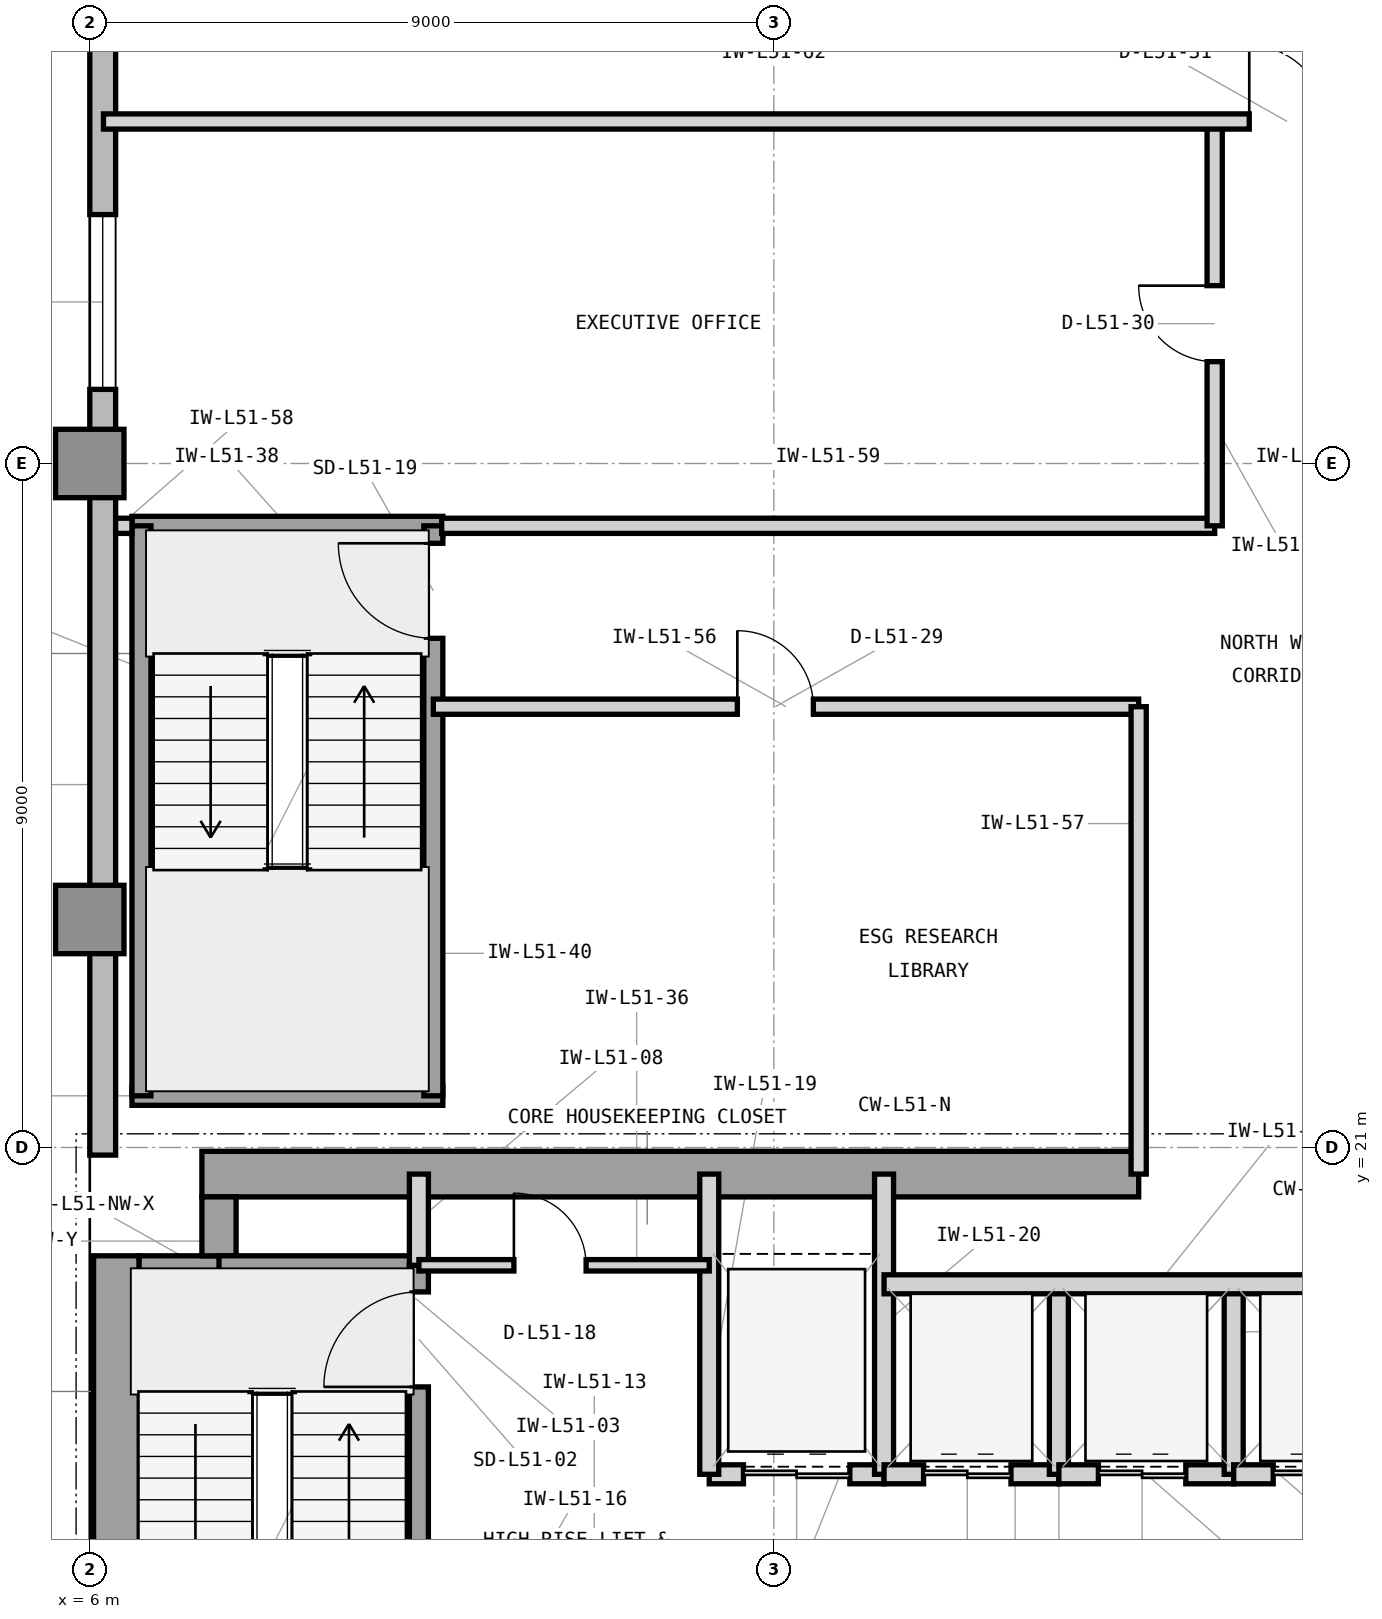
"""IFC4 building model, lengths in metres.
Left out: names, types, materials, properties, quantities, classifications, styles, units other than length and angle.
Written with IfcOpenShell. Run it as: python <this file> out.ifc"""

import sys

from ifc_helpers import new_model, si_unit, direction, frame, frame_2d, origin, origin_2d, place, context, subcontext, project, spatial, rectangle, extrude, element, fill, save


model = new_model("IFC4")
c1 = context("Model", 3, precision=1e-05, world=origin(), true_north=direction((0.0, 1.0)))
c2 = subcontext(c1, "Body", "Model", "MODEL_VIEW")
j1 = project(units=[si_unit("LENGTHUNIT", "METRE"), si_unit("PLANEANGLEUNIT", "RADIAN")], contexts=[c1])
p1 = place(None, origin())
s1 = spatial("IfcSite", under=j1, at=p1, CompositionType="ELEMENT")
p2 = place(p1, origin())
s2 = spatial("IfcBuilding", under=s1, at=p2, CompositionType="ELEMENT")
p3 = place(p2, frame((0.0, 0.0, 211.2)))
s3 = spatial("IfcBuildingStorey", under=s2, at=p3, CompositionType="ELEMENT", Elevation=211.2)
p4 = place(p3, frame((6.35, 4.425, 0.0), z_axis=(0.0, 0.0, 1.0), x_axis=(0.0, 1.0, 0.0)))
e1 = element("IfcWall", 1, at=p4, inside=s3, PredefinedType="SHEAR", context=c2, shape_type="SweptSolid", body=[
    extrude(rectangle(XDim=15.15, YDim=0.6, at=frame_2d((7.575, 0.0))), origin(), (0.0, 0.0, 1.0), 3.9),
])
p5 = place(p3, frame((7.475, 20.65, 0.0), z_axis=(0.0, 0.0, 1.0), x_axis=(1.0, 0.0, 0.0)))
e2 = element("IfcWall", 2, at=p5, inside=s3, PredefinedType="SHEAR", context=c2, shape_type="SweptSolid", body=[
    extrude(rectangle(XDim=12.325, YDim=0.6, at=frame_2d((6.163, 0.0))), origin(), (0.0, 0.0, 1.0), 3.9),
])
p6 = place(p3, frame((6.65, 19.35, 0.0), z_axis=(0.0, 0.0, 1.0), x_axis=(1.0, 0.0, 0.0)))
e3 = element("IfcWall", 3, at=p6, inside=s3, PredefinedType="SHEAR", context=c2, shape_type="SweptSolid", body=[
    extrude(rectangle(XDim=1.275, YDim=0.45, at=frame_2d((0.638, 0.0))), origin(), (0.0, 0.0, 1.0), 3.9),
])
p7 = place(p3, frame((7.7, 19.575, 0.0), z_axis=(0.0, 0.0, 1.0), x_axis=(0.0, 1.0, 0.0)))
e4 = element("IfcWall", 4, at=p7, inside=s3, PredefinedType="SHEAR", context=c2, shape_type="SweptSolid", body=[
    extrude(rectangle(XDim=0.775, YDim=0.45, at=frame_2d((0.388, 0.0))), origin(), (0.0, 0.0, 1.0), 3.9),
])
for number, where, z_axis, x_axis in (
    (5, (6.0, 24.0, 0.0), (0.0, 0.0, 1.0), (1.0, 0.0, 0.0)),
    (6, (6.0, 30.0, 0.0), (0.0, 0.0, 1.0), (1.0, 0.0, 0.0)),
):
    element("IfcColumn", number, at=place(p3, frame(where, z_axis=z_axis, x_axis=x_axis)), inside=s3, PredefinedType="COLUMN", context=c2, shape_type="SweptSolid", body=[
        extrude(rectangle(XDim=0.9, YDim=0.9, at=origin_2d()), origin(), (0.0, 0.0, 1.0), 3.9),
    ])
p8 = place(p3, frame((6.17, 40.4, 0.0), z_axis=(0.0, 0.0, 1.0), x_axis=(0.0, -1.0, 0.0)))
e7 = element("IfcWall", 7, at=p8, inside=s3, PredefinedType="STANDARD", context=c2, shape_type="SweptSolid", body=[
    extrude(rectangle(XDim=19.5, YDim=0.34, at=frame_2d((9.75, 0.0))), origin(), (0.0, 0.0, 1.0), 3.7),
])
p9 = place(p8, frame((7.125, 0.0, 0.9)))
e8 = element("IfcOpeningElement", 8, at=p9, cuts=e7, PredefinedType="OPENING", context=c2, shape_type="SweptSolid", body=[
    extrude(rectangle(XDim=2.3, YDim=2.2, at=frame_2d((1.15, 1.1))), frame((0.0, 0.18, 0.0), z_axis=(0.0, -1.0, 0.0), x_axis=(1.0, 0.0, 0.0)), (0.0, 0.0, 1.0), 0.36),
])
p10 = place(p3, frame((7.7, 19.45, 0.0), z_axis=(0.0, 0.0, 1.0), x_axis=(1.0, 0.0, 0.0)))
e9 = element("IfcWall", 9, at=p10, inside=s3, PredefinedType="SHEAR", context=c2, shape_type="SweptSolid", body=[
    extrude(rectangle(XDim=2.755, YDim=0.25, at=frame_2d((1.377, 0.0))), origin(), (0.0, 0.0, 1.0), 3.9),
])
p11 = place(p3, frame((10.33, 12.0, 0.0), z_axis=(0.0, 0.0, 1.0), x_axis=(0.0, 1.0, 0.0)))
e10 = element("IfcWall", 10, at=p11, inside=s3, PredefinedType="SHEAR", context=c2, shape_type="SweptSolid", body=[
    extrude(rectangle(XDim=7.45, YDim=0.25, at=frame_2d((3.725, 0.0))), origin(), (0.0, 0.0, 1.0), 3.9),
])
p12 = place(p11, frame((5.85, 0.0, 0.0)))
e11 = element("IfcOpeningElement", 11, at=p12, cuts=e10, PredefinedType="OPENING", context=c2, shape_type="SweptSolid", body=[
    extrude(rectangle(XDim=1.25, YDim=2.2, at=frame_2d((0.625, 1.1))), frame((0.0, 0.135, 0.0), z_axis=(0.0, -1.0, 0.0), x_axis=(1.0, 0.0, 0.0)), (0.0, 0.0, 1.0), 0.27),
])
p13 = place(p3, frame((10.33, 19.45, 0.0), z_axis=(0.0, 0.0, 1.0), x_axis=(0.0, 1.0, 0.0)))
e12 = element("IfcWall", 12, at=p13, inside=s3, PredefinedType="PARTITIONING", context=c2, shape_type="SweptSolid", body=[
    extrude(rectangle(XDim=1.2, YDim=0.25, at=frame_2d((0.6, 0.0))), origin(), (0.0, 0.0, 1.0), 3.69),
])
p14 = place(p3, frame((14.15, 16.7, 0.0), z_axis=(0.0, 0.0, 1.0), x_axis=(1.0, 0.0, 0.0)))
e13 = element("IfcWall", 13, at=p14, inside=s3, PredefinedType="PARTITIONING", context=c2, shape_type="SweptSolid", body=[
    extrude(rectangle(XDim=2.3, YDim=0.25, at=frame_2d((1.15, 0.0))), origin(), (0.0, 0.0, 1.0), 3.283),
])
p15 = place(p14, frame((0.45, 0.0, 0.0)))
e14 = element("IfcOpeningElement", 14, at=p15, cuts=e13, PredefinedType="OPENING", context=c2, shape_type="SweptSolid", body=[
    extrude(rectangle(XDim=1.4, YDim=2.35, at=frame_2d((0.7, 1.175))), frame((0.0, 0.135, 0.0), z_axis=(0.0, -1.0, 0.0), x_axis=(1.0, 0.0, 0.0)), (0.0, 0.0, 1.0), 0.27),
])
for number, where, z_axis, x_axis in (
    (15, (14.15, 16.7, 0.0), (0.0, 0.0, 1.0), (0.0, 1.0, 0.0)),
    (16, (16.45, 16.7, 0.0), (0.0, 0.0, 1.0), (0.0, 1.0, 0.0)),
):
    element("IfcWall", number, at=place(p3, frame(where, z_axis=z_axis, x_axis=x_axis)), inside=s3, PredefinedType="PARTITIONING", context=c2, shape_type="SweptSolid", body=[
        extrude(rectangle(XDim=3.95, YDim=0.25, at=frame_2d((1.975, 0.0))), origin(), (0.0, 0.0, 1.0), 3.69),
    ])
p16 = place(p3, frame((16.45, 16.7, 0.0), z_axis=(0.0, 0.0, 1.0), x_axis=(1.0, 0.0, 0.0)))
e17 = element("IfcWall", 17, at=p16, inside=s3, PredefinedType="PARTITIONING", context=c2, shape_type="SweptSolid", body=[
    extrude(rectangle(XDim=2.3, YDim=0.25, at=frame_2d((1.15, 0.0))), origin(), (0.0, 0.0, 1.0), 3.283),
])
p17 = place(p16, frame((0.52, 0.0, 0.0)))
e18 = element("IfcOpeningElement", 18, at=p17, cuts=e17, PredefinedType="OPENING", context=c2, shape_type="SweptSolid", body=[
    extrude(rectangle(XDim=1.15, YDim=2.25, at=frame_2d((0.575, 1.125))), frame((0.0, 0.135, 0.0), z_axis=(0.0, -1.0, 0.0), x_axis=(1.0, 0.0, 0.0)), (0.0, 0.0, 1.0), 0.27),
])
p18 = place(p3, frame((18.75, 16.7, 0.0), z_axis=(0.0, 0.0, 1.0), x_axis=(0.0, 1.0, 0.0)))
e19 = element("IfcWall", 19, at=p18, inside=s3, PredefinedType="PARTITIONING", context=c2, shape_type="SweptSolid", body=[
    extrude(rectangle(XDim=2.5, YDim=0.25, at=frame_2d((1.25, 0.0))), origin(), (0.0, 0.0, 1.0), 3.69),
])
p19 = place(p3, frame((18.75, 16.7, 0.0), z_axis=(0.0, 0.0, 1.0), x_axis=(1.0, 0.0, 0.0)))
e20 = element("IfcWall", 20, at=p19, inside=s3, PredefinedType="PARTITIONING", context=c2, shape_type="SweptSolid", body=[
    extrude(rectangle(XDim=2.3, YDim=0.25, at=frame_2d((1.15, 0.0))), origin(), (0.0, 0.0, 1.0), 3.283),
])
p20 = place(p19, frame((0.52, 0.0, 0.0)))
e21 = element("IfcOpeningElement", 21, at=p20, cuts=e20, PredefinedType="OPENING", context=c2, shape_type="SweptSolid", body=[
    extrude(rectangle(XDim=1.15, YDim=2.25, at=frame_2d((0.575, 1.125))), frame((0.0, 0.135, 0.0), z_axis=(0.0, -1.0, 0.0), x_axis=(1.0, 0.0, 0.0)), (0.0, 0.0, 1.0), 0.27),
])
p21 = place(p3, frame((21.05, 16.7, 0.0), z_axis=(0.0, 0.0, 1.0), x_axis=(0.0, 1.0, 0.0)))
e22 = element("IfcWall", 22, at=p21, inside=s3, PredefinedType="PARTITIONING", context=c2, shape_type="SweptSolid", body=[
    extrude(rectangle(XDim=2.5, YDim=0.25, at=frame_2d((1.25, 0.0))), origin(), (0.0, 0.0, 1.0), 3.69),
])
p22 = place(p3, frame((21.05, 16.7, 0.0), z_axis=(0.0, 0.0, 1.0), x_axis=(1.0, 0.0, 0.0)))
e23 = element("IfcWall", 23, at=p22, inside=s3, PredefinedType="PARTITIONING", context=c2, shape_type="SweptSolid", body=[
    extrude(rectangle(XDim=2.4, YDim=0.25, at=frame_2d((1.2, 0.0))), origin(), (0.0, 0.0, 1.0), 3.283),
])
p23 = place(p22, frame((0.52, 0.0, 0.0)))
e24 = element("IfcOpeningElement", 24, at=p23, cuts=e23, PredefinedType="OPENING", context=c2, shape_type="SweptSolid", body=[
    extrude(rectangle(XDim=1.15, YDim=2.25, at=frame_2d((0.575, 1.125))), frame((0.0, 0.135, 0.0), z_axis=(0.0, -1.0, 0.0), x_axis=(1.0, 0.0, 0.0)), (0.0, 0.0, 1.0), 0.27),
])
p24 = place(p3, frame((16.45, 19.2, 0.0), z_axis=(0.0, 0.0, 1.0), x_axis=(1.0, 0.0, 0.0)))
e25 = element("IfcWall", 25, at=p24, inside=s3, PredefinedType="PARTITIONING", context=c2, shape_type="SweptSolid", body=[
    extrude(rectangle(XDim=7.2, YDim=0.25, at=frame_2d((3.6, 0.0))), origin(), (0.0, 0.0, 1.0), 3.69),
])
p25 = place(p3, frame((10.33, 19.45, 0.0), z_axis=(0.0, 0.0, 1.0), x_axis=(1.0, 0.0, 0.0)))
e26 = element("IfcWall", 26, at=p25, inside=s3, PredefinedType="PARTITIONING", context=c2, shape_type="SweptSolid", body=[
    extrude(rectangle(XDim=3.82, YDim=0.15, at=frame_2d((1.91, 0.0))), origin(), (0.0, 0.0, 1.0), 3.69),
])
p26 = place(p25, frame((1.25, 0.0, 0.0)))
e27 = element("IfcOpeningElement", 27, at=p26, cuts=e26, PredefinedType="OPENING", context=c2, shape_type="SweptSolid", body=[
    extrude(rectangle(XDim=0.95, YDim=2.1, at=frame_2d((0.475, 1.05))), frame((0.0, 0.085, 0.0), z_axis=(0.0, -1.0, 0.0), x_axis=(1.0, 0.0, 0.0)), (0.0, 0.0, 1.0), 0.17),
])
for number, where, z_axis, x_axis in (
    (28, (6.555, 21.68, 0.0), (0.0, 0.0, 1.0), (1.0, 0.0, 0.0)),
    (29, (6.555, 29.18, 0.0), (0.0, 0.0, 1.0), (1.0, 0.0, 0.0)),
):
    element("IfcWall", number, at=place(p3, frame(where, z_axis=z_axis, x_axis=x_axis)), inside=s3, PredefinedType="SHEAR", context=c2, shape_type="SweptSolid", body=[
        extrude(rectangle(XDim=4.09, YDim=0.25, at=frame_2d((2.045, 0.0))), origin(), (0.0, 0.0, 1.0), 3.9),
    ])
p27 = place(p3, frame((6.68, 21.68, 0.0), z_axis=(0.0, 0.0, 1.0), x_axis=(0.0, 1.0, 0.0)))
e30 = element("IfcWall", 30, at=p27, inside=s3, PredefinedType="SHEAR", context=c2, shape_type="SweptSolid", body=[
    extrude(rectangle(XDim=7.5, YDim=0.25, at=frame_2d((3.75, 0.0))), origin(), (0.0, 0.0, 1.0), 3.9),
])
p28 = place(p3, frame((10.52, 21.68, 0.0), z_axis=(0.0, 0.0, 1.0), x_axis=(0.0, 1.0, 0.0)))
e31 = element("IfcWall", 31, at=p28, inside=s3, PredefinedType="SHEAR", context=c2, shape_type="SweptSolid", body=[
    extrude(rectangle(XDim=7.5, YDim=0.25, at=frame_2d((3.75, 0.0))), origin(), (0.0, 0.0, 1.0), 3.9),
])
p29 = place(p28, frame((6.02, 0.0, 0.0)))
e32 = element("IfcOpeningElement", 32, at=p29, cuts=e31, PredefinedType="OPENING", context=c2, shape_type="SweptSolid", body=[
    extrude(rectangle(XDim=1.25, YDim=2.2, at=frame_2d((0.625, 1.1))), frame((0.0, 0.135, 0.0), z_axis=(0.0, -1.0, 0.0), x_axis=(1.0, 0.0, 0.0)), (0.0, 0.0, 1.0), 0.27),
])
p30 = place(p3, frame((10.52, 26.8, 0.0), z_axis=(0.0, 0.0, 1.0), x_axis=(1.0, 0.0, 0.0)))
e33 = element("IfcWall", 33, at=p30, inside=s3, PredefinedType="PARTITIONING", context=c2, shape_type="SweptSolid", body=[
    extrude(rectangle(XDim=9.28, YDim=0.2, at=frame_2d((4.64, 0.0))), origin(), (0.0, 0.0, 1.0), 3.69),
])
p31 = place(p30, frame((4.0, 0.0, 0.0)))
e34 = element("IfcOpeningElement", 34, at=p31, cuts=e33, PredefinedType="OPENING", context=c2, shape_type="SweptSolid", body=[
    extrude(rectangle(XDim=1.0, YDim=2.15, at=frame_2d((0.5, 1.075))), frame((0.0, 0.11, 0.0), z_axis=(0.0, -1.0, 0.0), x_axis=(1.0, 0.0, 0.0)), (0.0, 0.0, 1.0), 0.22),
])
p32 = place(p3, frame((19.8, 20.65, 0.0), z_axis=(0.0, 0.0, 1.0), x_axis=(0.0, 1.0, 0.0)))
e35 = element("IfcWall", 35, at=p32, inside=s3, PredefinedType="PARTITIONING", context=c2, shape_type="SweptSolid", body=[
    extrude(rectangle(XDim=6.15, YDim=0.2, at=frame_2d((3.075, 0.0))), origin(), (0.0, 0.0, 1.0), 3.69),
])
p33 = place(p3, frame((6.34, 29.18, 0.0), z_axis=(0.0, 0.0, 1.0), x_axis=(1.0, 0.0, 0.0)))
e36 = element("IfcWall", 36, at=p33, inside=s3, PredefinedType="PARTITIONING", context=c2, shape_type="SweptSolid", body=[
    extrude(rectangle(XDim=0.215, YDim=0.2, at=frame_2d((0.107, 0.0))), origin(), (0.0, 0.0, 1.0), 3.69),
])
p34 = place(p3, frame((10.63, 29.18, 0.0), z_axis=(0.0, 0.0, 1.0), x_axis=(1.0, 0.0, 0.0)))
e37 = element("IfcWall", 37, at=p34, inside=s3, PredefinedType="PARTITIONING", context=c2, shape_type="SweptSolid", body=[
    extrude(rectangle(XDim=10.17, YDim=0.2, at=frame_2d((5.085, 0.0))), origin(), (0.0, 0.0, 1.0), 3.69),
])
p35 = place(p3, frame((20.8, 29.18, 0.0), z_axis=(0.0, 0.0, 1.0), x_axis=(0.0, 1.0, 0.0)))
e38 = element("IfcWall", 38, at=p35, inside=s3, PredefinedType="PARTITIONING", context=c2, shape_type="SweptSolid", body=[
    extrude(rectangle(XDim=5.32, YDim=0.2, at=frame_2d((2.66, 0.0))), origin(), (0.0, 0.0, 1.0), 3.69),
])
p36 = place(p35, frame((2.16, 0.0, 0.0)))
e39 = element("IfcOpeningElement", 39, at=p36, cuts=e38, PredefinedType="OPENING", context=c2, shape_type="SweptSolid", body=[
    extrude(rectangle(XDim=1.0, YDim=2.15, at=frame_2d((0.5, 1.075))), frame((0.0, 0.11, 0.0), z_axis=(0.0, -1.0, 0.0), x_axis=(1.0, 0.0, 0.0)), (0.0, 0.0, 1.0), 0.22),
])
p37 = place(p3, frame((6.18, 34.5, 0.0), z_axis=(0.0, 0.0, 1.0), x_axis=(1.0, 0.0, 0.0)))
e40 = element("IfcWall", 40, at=p37, inside=s3, PredefinedType="PARTITIONING", context=c2, shape_type="SweptSolid", body=[
    extrude(rectangle(XDim=17.64, YDim=0.2, at=frame_2d((8.82, 0.0))), origin(), (0.0, 0.0, 1.0), 3.69),
])
p38 = place(p37, frame((15.075, 0.0, 0.0)))
e41 = element("IfcOpeningElement", 41, at=p38, cuts=e40, PredefinedType="OPENING", context=c2, shape_type="SweptSolid", body=[
    extrude(rectangle(XDim=1.0, YDim=2.15, at=frame_2d((0.5, 1.075))), frame((0.0, 0.11, 0.0), z_axis=(0.0, -1.0, 0.0), x_axis=(1.0, 0.0, 0.0)), (0.0, 0.0, 1.0), 0.22),
])
p39 = place(p12, origin())
e42 = element("IfcDoor", 42, at=p39, inside=s3, OperationType="SINGLE_SWING_LEFT", PredefinedType="DOOR", context=c2, shape_type="SweptSolid", body=[
    extrude(rectangle(XDim=1.25, YDim=2.2, at=frame_2d((0.625, 1.1))), frame((0.0, 0.025, 0.0), z_axis=(0.0, -1.0, 0.0), x_axis=(1.0, 0.0, 0.0)), (0.0, 0.0, 1.0), 0.05),
])
fill(e11, e42)
p40 = place(p15, origin())
e43 = element("IfcDoor", 43, at=p40, inside=s3, OperationType="DOUBLE_DOOR_SLIDING", PredefinedType="DOOR", context=c2, shape_type="SweptSolid", body=[
    extrude(rectangle(XDim=1.4, YDim=2.35, at=frame_2d((0.7, 1.175))), frame((0.0, 0.025, 0.0), z_axis=(0.0, -1.0, 0.0), x_axis=(1.0, 0.0, 0.0)), (0.0, 0.0, 1.0), 0.05),
])
fill(e14, e43)
p41 = place(p17, origin())
e44 = element("IfcDoor", 44, at=p41, inside=s3, OperationType="DOUBLE_DOOR_SLIDING", PredefinedType="DOOR", context=c2, shape_type="SweptSolid", body=[
    extrude(rectangle(XDim=1.15, YDim=2.25, at=frame_2d((0.575, 1.125))), frame((0.0, 0.025, 0.0), z_axis=(0.0, -1.0, 0.0), x_axis=(1.0, 0.0, 0.0)), (0.0, 0.0, 1.0), 0.05),
])
fill(e18, e44)
p42 = place(p20, origin())
e45 = element("IfcDoor", 45, at=p42, inside=s3, OperationType="DOUBLE_DOOR_SLIDING", PredefinedType="DOOR", context=c2, shape_type="SweptSolid", body=[
    extrude(rectangle(XDim=1.15, YDim=2.25, at=frame_2d((0.575, 1.125))), frame((0.0, 0.025, 0.0), z_axis=(0.0, -1.0, 0.0), x_axis=(1.0, 0.0, 0.0)), (0.0, 0.0, 1.0), 0.05),
])
fill(e21, e45)
p43 = place(p23, origin())
e46 = element("IfcDoor", 46, at=p43, inside=s3, OperationType="DOUBLE_DOOR_SLIDING", PredefinedType="DOOR", context=c2, shape_type="SweptSolid", body=[
    extrude(rectangle(XDim=1.15, YDim=2.25, at=frame_2d((0.575, 1.125))), frame((0.0, 0.025, 0.0), z_axis=(0.0, -1.0, 0.0), x_axis=(1.0, 0.0, 0.0)), (0.0, 0.0, 1.0), 0.05),
])
fill(e24, e46)
p44 = place(p26, origin())
e47 = element("IfcDoor", 47, at=p44, inside=s3, OperationType="SINGLE_SWING_LEFT", PredefinedType="DOOR", context=c2, shape_type="SweptSolid", body=[
    extrude(rectangle(XDim=0.95, YDim=2.1, at=frame_2d((0.475, 1.05))), frame((0.0, 0.025, 0.0), z_axis=(0.0, -1.0, 0.0), x_axis=(1.0, 0.0, 0.0)), (0.0, 0.0, 1.0), 0.05),
])
fill(e27, e47)
p45 = place(p29, origin())
e48 = element("IfcDoor", 48, at=p45, inside=s3, OperationType="SINGLE_SWING_RIGHT", PredefinedType="DOOR", context=c2, shape_type="SweptSolid", body=[
    extrude(rectangle(XDim=1.25, YDim=2.2, at=frame_2d((0.625, 1.1))), frame((0.0, 0.025, 0.0), z_axis=(0.0, -1.0, 0.0), x_axis=(1.0, 0.0, 0.0)), (0.0, 0.0, 1.0), 0.05),
])
fill(e32, e48)
p46 = place(p31, origin())
e49 = element("IfcDoor", 49, at=p46, inside=s3, OperationType="SINGLE_SWING_LEFT", PredefinedType="DOOR", context=c2, shape_type="SweptSolid", body=[
    extrude(rectangle(XDim=1.0, YDim=2.15, at=frame_2d((0.5, 1.075))), frame((0.0, 0.025, 0.0), z_axis=(0.0, -1.0, 0.0), x_axis=(1.0, 0.0, 0.0)), (0.0, 0.0, 1.0), 0.05),
])
fill(e34, e49)
p47 = place(p36, origin())
e50 = element("IfcDoor", 50, at=p47, inside=s3, OperationType="SINGLE_SWING_RIGHT", PredefinedType="DOOR", context=c2, shape_type="SweptSolid", body=[
    extrude(rectangle(XDim=1.0, YDim=2.15, at=frame_2d((0.5, 1.075))), frame((0.0, 0.025, 0.0), z_axis=(0.0, -1.0, 0.0), x_axis=(1.0, 0.0, 0.0)), (0.0, 0.0, 1.0), 0.05),
])
fill(e39, e50)
p48 = place(p38, origin())
e51 = element("IfcDoor", 51, at=p48, inside=s3, OperationType="SINGLE_SWING_LEFT", PredefinedType="DOOR", context=c2, shape_type="SweptSolid", body=[
    extrude(rectangle(XDim=1.0, YDim=2.15, at=frame_2d((0.5, 1.075))), frame((0.0, 0.025, 0.0), z_axis=(0.0, -1.0, 0.0), x_axis=(1.0, 0.0, 0.0)), (0.0, 0.0, 1.0), 0.05),
])
fill(e41, e51)
p49 = place(p9, origin())
e52 = element("IfcWindow", 52, at=p49, inside=s3, PartitioningType="SINGLE_PANEL", PredefinedType="WINDOW", context=c2, shape_type="SweptSolid", body=[
    extrude(rectangle(XDim=2.3, YDim=2.2, at=frame_2d((1.15, 1.1))), frame((0.0, 0.11, 0.0), z_axis=(0.0, -1.0, 0.0), x_axis=(1.0, 0.0, 0.0)), (0.0, 0.0, 1.0), 0.06),
])
fill(e8, e52)
save(model, sys.argv[1])
